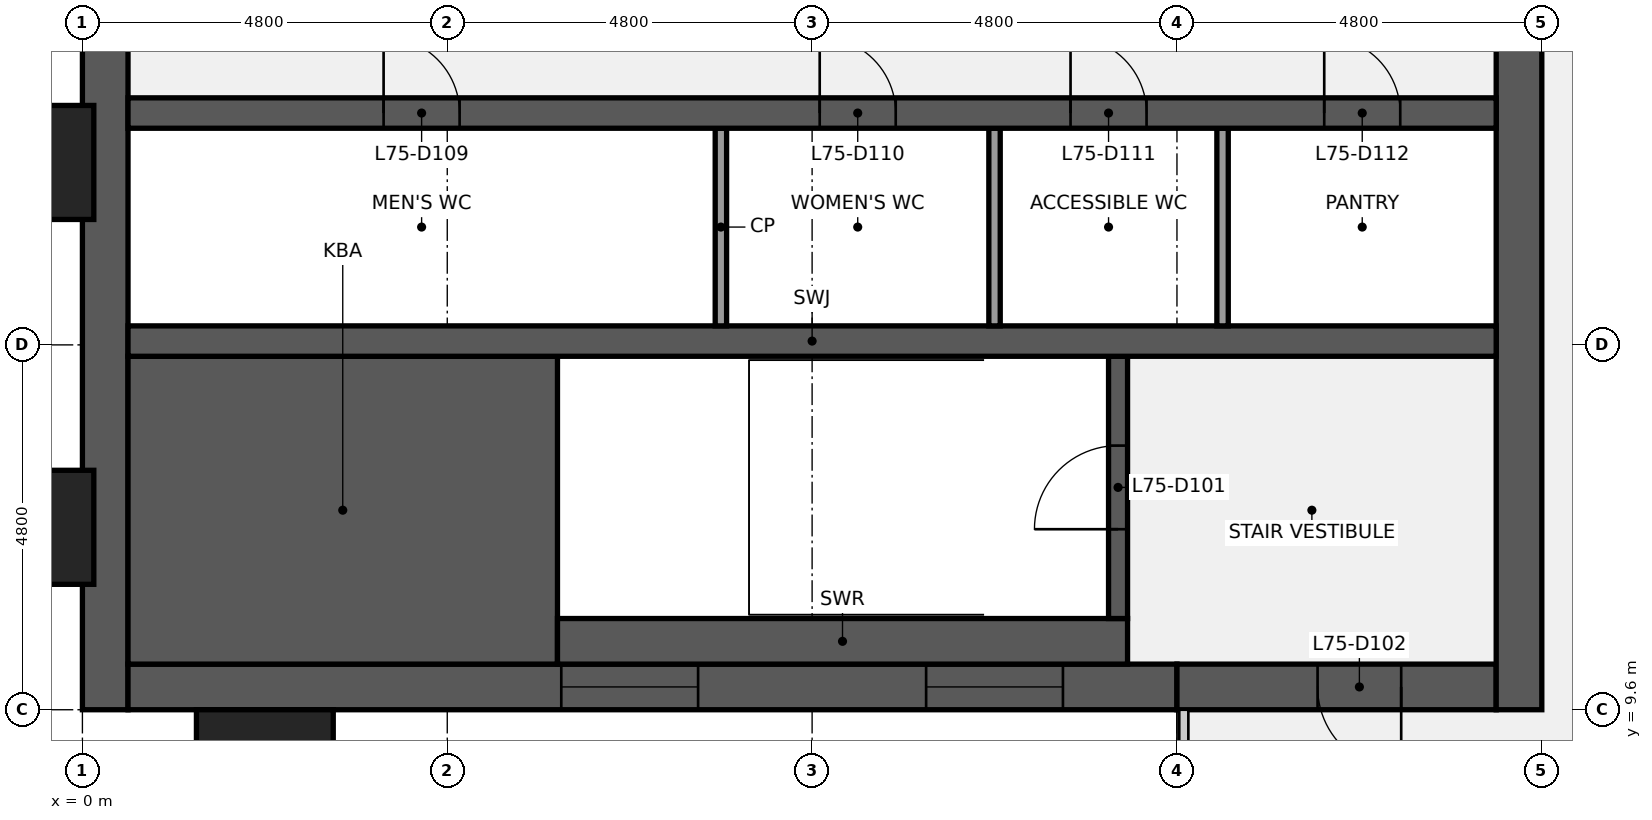
"""IFC4 building model, lengths in metres.
Left out: names, types, materials, properties, quantities, classifications, styles, units other than length and angle.
Written with IfcOpenShell. Run it as: python <this file> out.ifc"""

import sys

from ifc_helpers import new_model, si_unit, direction, frame, frame_2d, origin, origin_2d, place, context, subcontext, project, spatial, rectangle, extrude, element, fill, save


model = new_model("IFC4")
c1 = context("Model", 3, precision=1e-05, world=origin(), true_north=direction((0.0, 1.0)))
c2 = subcontext(c1, "Body", "Model", "MODEL_VIEW")
j1 = project(units=[si_unit("LENGTHUNIT", "METRE"), si_unit("PLANEANGLEUNIT", "RADIAN")], contexts=[c1])
p1 = place(None, origin())
s1 = spatial("IfcSite", under=j1, at=p1, CompositionType="ELEMENT")
p2 = place(p1, origin())
s2 = spatial("IfcBuilding", under=s1, at=p2, CompositionType="ELEMENT")
p3 = place(p2, frame((0.0, 0.0, 338.3)))
s3 = spatial("IfcBuildingStorey", under=s2, at=p3, CompositionType="ELEMENT", Elevation=338.3)
p4 = place(p3, frame((0.3, 9.6, 0.0), z_axis=(0.0, 0.0, 1.0), x_axis=(0.0, 1.0, 0.0)))
e1 = element("IfcWall", 1, at=p4, inside=s3, PredefinedType="SHEAR", context=c2, shape_type="SweptSolid", body=[
    extrude(rectangle(XDim=28.8, YDim=0.6, at=frame_2d((14.4, 0.0))), origin(), (0.0, 0.0, 1.0), 3.84),
])
p5 = place(p4, frame((8.85, 0.0, 0.9)))
e2 = element("IfcOpeningElement", 2, at=p5, cuts=e1, PredefinedType="OPENING", context=c2, shape_type="SweptSolid", body=[
    extrude(rectangle(XDim=1.5, YDim=1.5, at=frame_2d((0.75, 0.75))), frame((0.0, 0.31, 0.0), z_axis=(0.0, -1.0, 0.0), x_axis=(1.0, 0.0, 0.0)), (0.0, 0.0, 1.0), 0.62),
])
p6 = place(p4, frame((18.45, 0.0, 0.9)))
e3 = element("IfcOpeningElement", 3, at=p6, cuts=e1, PredefinedType="OPENING", context=c2, shape_type="SweptSolid", body=[
    extrude(rectangle(XDim=1.5, YDim=1.5, at=frame_2d((0.75, 0.75))), frame((0.0, 0.31, 0.0), z_axis=(0.0, -1.0, 0.0), x_axis=(1.0, 0.0, 0.0)), (0.0, 0.0, 1.0), 0.62),
])
p7 = place(p3, frame((14.4, 9.9, 0.0), z_axis=(0.0, 0.0, 1.0), x_axis=(-1.0, 0.0, 0.0)))
e4 = element("IfcWall", 4, at=p7, inside=s3, PredefinedType="SHEAR", context=c2, shape_type="SweptSolid", body=[
    extrude(rectangle(XDim=13.8, YDim=0.6, at=frame_2d((6.9, 0.0))), origin(), (0.0, 0.0, 1.0), 3.84),
])
p8 = place(p7, frame((6.3, 0.0, 0.9)))
e5 = element("IfcOpeningElement", 5, at=p8, cuts=e4, PredefinedType="OPENING", context=c2, shape_type="SweptSolid", body=[
    extrude(rectangle(XDim=1.8, YDim=1.5, at=frame_2d((0.9, 0.75))), frame((0.0, 0.31, 0.0), z_axis=(0.0, -1.0, 0.0), x_axis=(1.0, 0.0, 0.0)), (0.0, 0.0, 1.0), 0.62),
])
p9 = place(p7, frame((1.5, 0.0, 0.9)))
e6 = element("IfcOpeningElement", 6, at=p9, cuts=e4, PredefinedType="OPENING", context=c2, shape_type="SweptSolid", body=[
    extrude(rectangle(XDim=1.8, YDim=1.5, at=frame_2d((0.9, 0.75))), frame((0.0, 0.31, 0.0), z_axis=(0.0, -1.0, 0.0), x_axis=(1.0, 0.0, 0.0)), (0.0, 0.0, 1.0), 0.62),
])
p10 = place(p3, frame((18.6, 9.9, 0.0), z_axis=(0.0, 0.0, 1.0), x_axis=(-1.0, 0.0, 0.0)))
e7 = element("IfcWall", 7, at=p10, inside=s3, PredefinedType="SHEAR", context=c2, shape_type="SweptSolid", body=[
    extrude(rectangle(XDim=4.2, YDim=0.6, at=frame_2d((2.1, 0.0))), origin(), (0.0, 0.0, 1.0), 3.84),
])
p11 = place(p10, frame((1.25, 0.0, 0.0)))
e8 = element("IfcOpeningElement", 8, at=p11, cuts=e7, PredefinedType="OPENING", context=c2, shape_type="SweptSolid", body=[
    extrude(rectangle(XDim=1.1, YDim=2.1, at=frame_2d((0.55, 1.05))), frame((0.0, 0.31, 0.0), z_axis=(0.0, -1.0, 0.0), x_axis=(1.0, 0.0, 0.0)), (0.0, 0.0, 1.0), 0.62),
])
p12 = place(p3, frame((18.9, 38.4, 0.0), z_axis=(0.0, 0.0, 1.0), x_axis=(0.0, -1.0, 0.0)))
e9 = element("IfcWall", 9, at=p12, inside=s3, PredefinedType="SHEAR", context=c2, shape_type="SweptSolid", body=[
    extrude(rectangle(XDim=28.8, YDim=0.6, at=frame_2d((14.4, 0.0))), origin(), (0.0, 0.0, 1.0), 3.84),
])
p13 = place(p12, frame((18.3, 0.0, 0.0)))
e10 = element("IfcOpeningElement", 10, at=p13, cuts=e9, PredefinedType="OPENING", context=c2, shape_type="SweptSolid", body=[
    extrude(rectangle(XDim=1.8, YDim=2.1, at=frame_2d((0.9, 1.05))), frame((0.0, 0.31, 0.0), z_axis=(0.0, -1.0, 0.0), x_axis=(1.0, 0.0, 0.0)), (0.0, 0.0, 1.0), 0.62),
])
p14 = place(p12, frame((8.7, 0.0, 0.0)))
e11 = element("IfcOpeningElement", 11, at=p14, cuts=e9, PredefinedType="OPENING", context=c2, shape_type="SweptSolid", body=[
    extrude(rectangle(XDim=1.8, YDim=2.1, at=frame_2d((0.9, 1.05))), frame((0.0, 0.31, 0.0), z_axis=(0.0, -1.0, 0.0), x_axis=(1.0, 0.0, 0.0)), (0.0, 0.0, 1.0), 0.62),
])
p15 = place(p3, frame((0.6, 12.225, 0.0), z_axis=(0.0, 0.0, 1.0), x_axis=(1.0, 0.0, 0.0)))
e12 = element("IfcWall", 12, at=p15, inside=s3, PredefinedType="SHEAR", context=c2, shape_type="SweptSolid", body=[
    extrude(rectangle(XDim=5.65, YDim=4.05, at=frame_2d((2.825, 0.0))), origin(), (0.0, 0.0, 1.0), 3.84),
])
p16 = place(p3, frame((6.25, 10.5, 0.0), z_axis=(0.0, 0.0, 1.0), x_axis=(1.0, 0.0, 0.0)))
e13 = element("IfcWall", 13, at=p16, inside=s3, PredefinedType="SHEAR", context=c2, shape_type="SweptSolid", body=[
    extrude(rectangle(XDim=7.5, YDim=0.6, at=frame_2d((3.75, 0.0))), origin(), (0.0, 0.0, 1.0), 3.84),
])
p17 = place(p3, frame((13.625, 10.8, 0.0), z_axis=(0.0, 0.0, 1.0), x_axis=(0.0, 1.0, 0.0)))
e14 = element("IfcWall", 14, at=p17, inside=s3, PredefinedType="SHEAR", context=c2, shape_type="SweptSolid", body=[
    extrude(rectangle(XDim=3.45, YDim=0.25, at=frame_2d((1.725, 0.0))), origin(), (0.0, 0.0, 1.0), 3.84),
])
p18 = place(p17, frame((1.175, 0.0, 0.0)))
e15 = element("IfcOpeningElement", 15, at=p18, cuts=e14, PredefinedType="OPENING", context=c2, shape_type="SweptSolid", body=[
    extrude(rectangle(XDim=1.1, YDim=2.1, at=frame_2d((0.55, 1.05))), frame((0.0, 0.135, 0.0), z_axis=(0.0, -1.0, 0.0), x_axis=(1.0, 0.0, 0.0)), (0.0, 0.0, 1.0), 0.27),
])
p19 = place(p3, frame((0.6, 14.45, 0.0), z_axis=(0.0, 0.0, 1.0), x_axis=(1.0, 0.0, 0.0)))
e16 = element("IfcWall", 16, at=p19, inside=s3, PredefinedType="SHEAR", context=c2, shape_type="SweptSolid", body=[
    extrude(rectangle(XDim=18.0, YDim=0.4, at=frame_2d((9.0, 0.0))), origin(), (0.0, 0.0, 1.0), 3.84),
])
for number, where, z_axis, x_axis in (
    (17, (8.4, 14.65, 0.0), (0.0, 0.0, 1.0), (0.0, 1.0, 0.0)),
    (18, (12.0, 14.65, 0.0), (0.0, 0.0, 1.0), (0.0, 1.0, 0.0)),
    (19, (15.0, 14.65, 0.0), (0.0, 0.0, 1.0), (0.0, 1.0, 0.0)),
):
    element("IfcWall", number, at=place(p3, frame(where, z_axis=z_axis, x_axis=x_axis)), inside=s3, PredefinedType="PARTITIONING", context=c2, shape_type="SweptSolid", body=[
        extrude(rectangle(XDim=2.6, YDim=0.15, at=frame_2d((1.3, 0.0))), origin(), (0.0, 0.0, 1.0), 3.84),
    ])
p20 = place(p3, frame((0.6, 17.45, 0.0), z_axis=(0.0, 0.0, 1.0), x_axis=(1.0, 0.0, 0.0)))
e20 = element("IfcWall", 20, at=p20, inside=s3, PredefinedType="SHEAR", context=c2, shape_type="SweptSolid", body=[
    extrude(rectangle(XDim=18.0, YDim=0.4, at=frame_2d((9.0, 0.0))), origin(), (0.0, 0.0, 1.0), 3.84),
])
p21 = place(p20, frame((3.363, 0.0, 0.0)))
e21 = element("IfcOpeningElement", 21, at=p21, cuts=e20, PredefinedType="OPENING", context=c2, shape_type="SweptSolid", body=[
    extrude(rectangle(XDim=1.0, YDim=2.1, at=frame_2d((0.5, 1.05))), frame((0.0, 0.21, 0.0), z_axis=(0.0, -1.0, 0.0), x_axis=(1.0, 0.0, 0.0)), (0.0, 0.0, 1.0), 0.42),
])
p22 = place(p20, frame((9.1, 0.0, 0.0)))
e22 = element("IfcOpeningElement", 22, at=p22, cuts=e20, PredefinedType="OPENING", context=c2, shape_type="SweptSolid", body=[
    extrude(rectangle(XDim=1.0, YDim=2.1, at=frame_2d((0.5, 1.05))), frame((0.0, 0.21, 0.0), z_axis=(0.0, -1.0, 0.0), x_axis=(1.0, 0.0, 0.0)), (0.0, 0.0, 1.0), 0.42),
])
p23 = place(p20, frame((12.4, 0.0, 0.0)))
e23 = element("IfcOpeningElement", 23, at=p23, cuts=e20, PredefinedType="OPENING", context=c2, shape_type="SweptSolid", body=[
    extrude(rectangle(XDim=1.0, YDim=2.1, at=frame_2d((0.5, 1.05))), frame((0.0, 0.21, 0.0), z_axis=(0.0, -1.0, 0.0), x_axis=(1.0, 0.0, 0.0)), (0.0, 0.0, 1.0), 0.42),
])
p24 = place(p20, frame((15.738, 0.0, 0.0)))
e24 = element("IfcOpeningElement", 24, at=p24, cuts=e20, PredefinedType="OPENING", context=c2, shape_type="SweptSolid", body=[
    extrude(rectangle(XDim=1.0, YDim=2.1, at=frame_2d((0.5, 1.05))), frame((0.0, 0.21, 0.0), z_axis=(0.0, -1.0, 0.0), x_axis=(1.0, 0.0, 0.0)), (0.0, 0.0, 1.0), 0.42),
])
for number, where, z_axis, x_axis in (
    (25, (-0.75, 12.0, 0.0), (0.0, 0.0, 1.0), (0.0, 1.0, 0.0)),
    (26, (-0.75, 16.8, 0.0), (0.0, 0.0, 1.0), (0.0, 1.0, 0.0)),
    (27, (2.4, 8.85, 0.0), (0.0, 0.0, 1.0), (1.0, 0.0, 0.0)),
):
    element("IfcColumn", number, at=place(p3, frame(where, z_axis=z_axis, x_axis=x_axis)), inside=s3, PredefinedType="PILASTER", context=c2, shape_type="SweptSolid", body=[
        extrude(rectangle(XDim=1.8, YDim=1.5, at=origin_2d()), origin(), (0.0, 0.0, 1.0), 4.0),
    ])
p25 = place(p18, origin())
e28 = element("IfcDoor", 28, at=p25, inside=s3, OperationType="SINGLE_SWING_LEFT", PredefinedType="DOOR", context=c2, shape_type="SweptSolid", body=[
    extrude(rectangle(XDim=1.1, YDim=2.1, at=frame_2d((0.55, 1.05))), frame((0.0, 0.025, 0.0), z_axis=(0.0, -1.0, 0.0), x_axis=(1.0, 0.0, 0.0)), (0.0, 0.0, 1.0), 0.05),
])
fill(e15, e28)
p26 = place(p11, origin())
e29 = element("IfcDoor", 29, at=p26, inside=s3, OperationType="SINGLE_SWING_LEFT", PredefinedType="DOOR", context=c2, shape_type="SweptSolid", body=[
    extrude(rectangle(XDim=1.1, YDim=2.1, at=frame_2d((0.55, 1.05))), frame((0.0, 0.025, 0.0), z_axis=(0.0, -1.0, 0.0), x_axis=(1.0, 0.0, 0.0)), (0.0, 0.0, 1.0), 0.05),
])
fill(e8, e29)
p27 = place(p21, origin())
e30 = element("IfcDoor", 30, at=p27, inside=s3, OperationType="SINGLE_SWING_LEFT", PredefinedType="DOOR", context=c2, shape_type="SweptSolid", body=[
    extrude(rectangle(XDim=1.0, YDim=2.1, at=frame_2d((0.5, 1.05))), frame((0.0, 0.025, 0.0), z_axis=(0.0, -1.0, 0.0), x_axis=(1.0, 0.0, 0.0)), (0.0, 0.0, 1.0), 0.05),
])
fill(e21, e30)
p28 = place(p22, origin())
e31 = element("IfcDoor", 31, at=p28, inside=s3, OperationType="SINGLE_SWING_LEFT", PredefinedType="DOOR", context=c2, shape_type="SweptSolid", body=[
    extrude(rectangle(XDim=1.0, YDim=2.1, at=frame_2d((0.5, 1.05))), frame((0.0, 0.025, 0.0), z_axis=(0.0, -1.0, 0.0), x_axis=(1.0, 0.0, 0.0)), (0.0, 0.0, 1.0), 0.05),
])
fill(e22, e31)
p29 = place(p23, origin())
e32 = element("IfcDoor", 32, at=p29, inside=s3, OperationType="SINGLE_SWING_LEFT", PredefinedType="DOOR", context=c2, shape_type="SweptSolid", body=[
    extrude(rectangle(XDim=1.0, YDim=2.1, at=frame_2d((0.5, 1.05))), frame((0.0, 0.025, 0.0), z_axis=(0.0, -1.0, 0.0), x_axis=(1.0, 0.0, 0.0)), (0.0, 0.0, 1.0), 0.05),
])
fill(e23, e32)
p30 = place(p24, origin())
e33 = element("IfcDoor", 33, at=p30, inside=s3, OperationType="SINGLE_SWING_LEFT", PredefinedType="DOOR", context=c2, shape_type="SweptSolid", body=[
    extrude(rectangle(XDim=1.0, YDim=2.1, at=frame_2d((0.5, 1.05))), frame((0.0, 0.025, 0.0), z_axis=(0.0, -1.0, 0.0), x_axis=(1.0, 0.0, 0.0)), (0.0, 0.0, 1.0), 0.05),
])
fill(e24, e33)
p31 = place(p8, origin())
e34 = element("IfcWindow", 34, at=p31, inside=s3, PartitioningType="SINGLE_PANEL", PredefinedType="WINDOW", context=c2, shape_type="SweptSolid", body=[
    extrude(rectangle(XDim=1.8, YDim=1.5, at=frame_2d((0.9, 0.75))), frame((0.0, 0.03, 0.0), z_axis=(0.0, -1.0, 0.0), x_axis=(1.0, 0.0, 0.0)), (0.0, 0.0, 1.0), 0.06),
])
fill(e5, e34)
p32 = place(p9, origin())
e35 = element("IfcWindow", 35, at=p32, inside=s3, PartitioningType="SINGLE_PANEL", PredefinedType="WINDOW", context=c2, shape_type="SweptSolid", body=[
    extrude(rectangle(XDim=1.8, YDim=1.5, at=frame_2d((0.9, 0.75))), frame((0.0, 0.03, 0.0), z_axis=(0.0, -1.0, 0.0), x_axis=(1.0, 0.0, 0.0)), (0.0, 0.0, 1.0), 0.06),
])
fill(e6, e35)
save(model, sys.argv[1])
